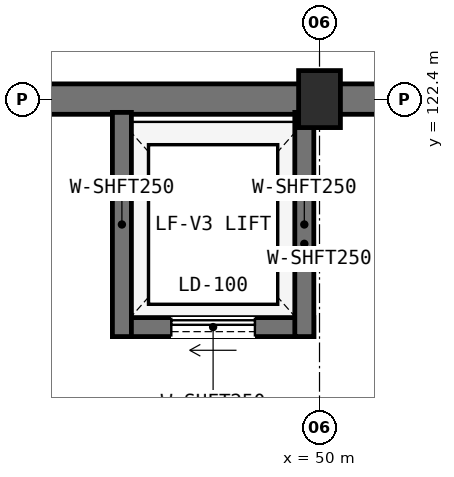
"""IFC4 building model, lengths in metres.
Left out: names, types, materials, properties, quantities, classifications, styles, units other than length and angle.
Written with IfcOpenShell. Run it as: python <this file> out.ifc"""

import sys

from ifc_helpers import new_model, si_unit, direction, frame, frame_2d, origin, origin_2d, place, context, subcontext, project, spatial, rectangle, extrude, element, fill, save


model = new_model("IFC4")
c1 = context("Model", 3, precision=1e-05, world=origin(), true_north=direction((0.0, 1.0)))
c2 = subcontext(c1, "Body", "Model", "MODEL_VIEW")
j1 = project(units=[si_unit("LENGTHUNIT", "METRE"), si_unit("PLANEANGLEUNIT", "RADIAN")], contexts=[c1])
p1 = place(None, origin())
s1 = spatial("IfcSite", under=j1, at=p1, CompositionType="ELEMENT")
p2 = place(p1, origin())
s2 = spatial("IfcBuilding", under=s1, at=p2, CompositionType="ELEMENT")
p3 = place(p2, frame((0.0, 0.0, -4.5)))
s3 = spatial("IfcBuildingStorey", under=s2, at=p3, CompositionType="ELEMENT", Elevation=-4.5)
p4 = place(p3, frame((50.0, 122.4, 0.0), z_axis=(0.0, 0.0, 1.0), x_axis=(1.0, 0.0, 0.0)))
e1 = element("IfcColumn", 1, at=p4, inside=s3, PredefinedType="COLUMN", context=c2, shape_type="SweptSolid", body=[
    extrude(rectangle(XDim=0.55, YDim=0.75, at=origin_2d()), origin(), (0.0, 0.0, 1.0), 4.5),
])
p5 = place(p3, frame((176.2, 122.4, 0.0), z_axis=(0.0, 0.0, 1.0), x_axis=(-1.0, 0.0, 0.0)))
e2 = element("IfcWall", 2, at=p5, inside=s3, PredefinedType="USERDEFINED", context=c2, shape_type="SweptSolid", body=[
    extrude(rectangle(XDim=168.4, YDim=0.4, at=frame_2d((84.2, 0.0))), origin(), (0.0, 0.0, 1.0), 4.5),
])
p6 = place(p3, frame((47.275, 119.4, 0.0), z_axis=(0.0, 0.0, 1.0), x_axis=(1.0, 0.0, 0.0)))
e3 = element("IfcWall", 3, at=p6, inside=s3, PredefinedType="SOLIDWALL", context=c2, shape_type="SweptSolid", body=[
    extrude(rectangle(XDim=2.65, YDim=0.25, at=frame_2d((1.325, 0.0))), origin(), (0.0, 0.0, 1.0), 4.18),
])
p7 = place(p6, frame((0.775, 0.0, 0.0)))
e4 = element("IfcOpeningElement", 4, at=p7, cuts=e3, PredefinedType="OPENING", context=c2, shape_type="SweptSolid", body=[
    extrude(rectangle(XDim=1.1, YDim=2.2, at=frame_2d((0.55, 1.1))), frame((0.0, 0.135, 0.0), z_axis=(0.0, -1.0, 0.0), x_axis=(1.0, 0.0, 0.0)), (0.0, 0.0, 1.0), 0.27),
])
for number, where, z_axis, x_axis in (
    (5, (47.4, 119.275, 0.0), (0.0, 0.0, 1.0), (0.0, 1.0, 0.0)),
    (6, (49.8, 119.275, 0.0), (0.0, 0.0, 1.0), (0.0, 1.0, 0.0)),
):
    element("IfcWall", number, at=place(p3, frame(where, z_axis=z_axis, x_axis=x_axis)), inside=s3, PredefinedType="SOLIDWALL", context=c2, shape_type="SweptSolid", body=[
        extrude(rectangle(XDim=2.95, YDim=0.25, at=frame_2d((1.475, 0.0))), origin(), (0.0, 0.0, 1.0), 4.18),
    ])
p8 = place(p7, origin())
e7 = element("IfcDoor", 7, at=p8, inside=s3, OperationType="SLIDING_TO_LEFT", PredefinedType="DOOR", context=c2, shape_type="SweptSolid", body=[
    extrude(rectangle(XDim=1.1, YDim=2.2, at=frame_2d((0.55, 1.1))), frame((0.0, 0.025, 0.0), z_axis=(0.0, -1.0, 0.0), x_axis=(1.0, 0.0, 0.0)), (0.0, 0.0, 1.0), 0.05),
])
fill(e4, e7)
save(model, sys.argv[1])
